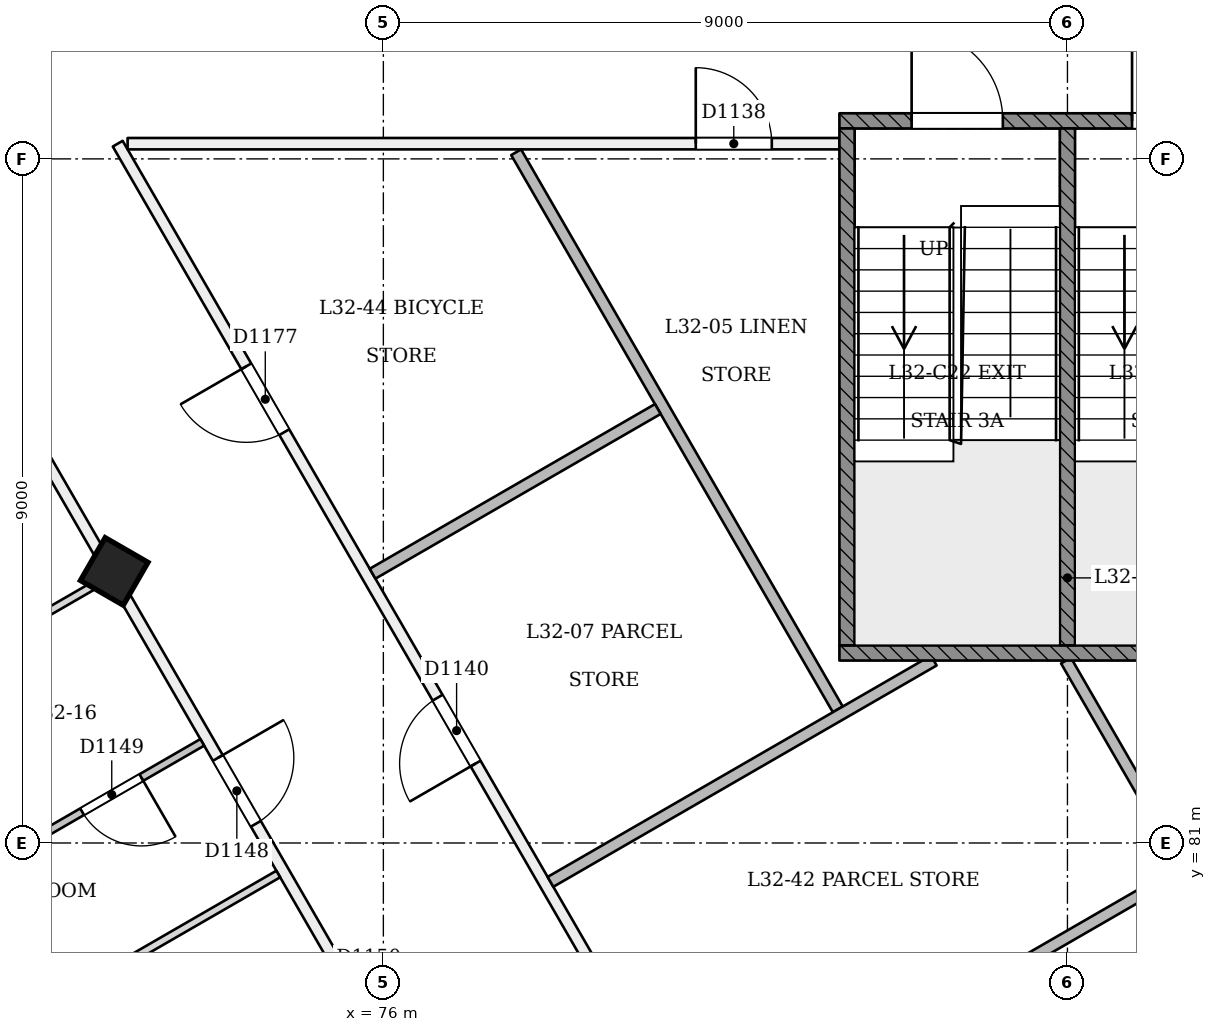
"""IFC4 building model, lengths in metres.
Left out: names, types, materials, properties, quantities, classifications, styles, units other than length and angle.
Written with IfcOpenShell. Run it as: python <this file> out.ifc"""

import sys

from ifc_helpers import new_model, si_unit, direction, frame, frame_2d, origin, origin_2d, place, context, subcontext, project, spatial, rectangle, extrude, element, fill, save


model = new_model("IFC4")
c1 = context("Model", 3, precision=1e-05, world=origin(), true_north=direction((0.0, 1.0)))
c2 = subcontext(c1, "Body", "Model", "MODEL_VIEW")
j1 = project(units=[si_unit("LENGTHUNIT", "METRE"), si_unit("PLANEANGLEUNIT", "RADIAN")], contexts=[c1])
p1 = place(None, origin())
s1 = spatial("IfcSite", under=j1, at=p1, CompositionType="ELEMENT")
p2 = place(p1, origin())
s2 = spatial("IfcBuilding", under=s1, at=p2, CompositionType="ELEMENT")
p3 = place(p2, frame((0.0, 0.0, 127.8)))
s3 = spatial("IfcBuildingStorey", under=s2, at=p3, CompositionType="ELEMENT", Elevation=127.8)
p4 = place(p3, frame((72.432, 84.526, -0.02), z_axis=(0.02222134892, 0.038480872521, 0.999012229206), x_axis=(-0.865639418776, -0.499186807044, 0.038482831667)))
e1 = element("IfcColumn", 1, at=p4, inside=s3, PredefinedType="COLUMN", context=c2, shape_type="SweptSolid", body=[
    extrude(rectangle(XDim=0.65, YDim=0.65, at=origin_2d()), origin(), (0.0, 0.0, 1.0), 3.604),
])
p5 = place(p3, frame((85.0, 68.559, 0.0), z_axis=(0.0, 0.0, 1.0), x_axis=(-0.499999561005, 0.866025657238, 0.0)))
e2 = element("IfcWall", 2, at=p5, inside=s3, PredefinedType="PARTITIONING", context=c2, shape_type="SweptSolid", body=[
    extrude(rectangle(XDim=24.989, YDim=0.15, at=frame_2d((12.495, 0.0))), origin(), (0.0, 0.0, 1.0), 3.15),
])
p6 = place(p5, frame((2.515, 0.0, 0.0)))
e3 = element("IfcOpeningElement", 3, at=p6, cuts=e2, PredefinedType="OPENING", context=c2, shape_type="SweptSolid", body=[
    extrude(rectangle(XDim=0.9, YDim=2.1, at=frame_2d((0.45, 1.05))), frame((0.0, 0.085, 0.0), z_axis=(0.0, -1.0, 0.0), x_axis=(1.0, 0.0, 0.0)), (0.0, 0.0, 1.0), 0.171),
])
p7 = place(p5, frame((15.573, 0.0, 0.0)))
e4 = element("IfcOpeningElement", 4, at=p7, cuts=e2, PredefinedType="OPENING", context=c2, shape_type="SweptSolid", body=[
    extrude(rectangle(XDim=1.0, YDim=2.1, at=frame_2d((0.5, 1.05))), frame((0.0, 0.085, 0.0), z_axis=(0.0, -1.0, 0.0), x_axis=(1.0, 0.0, 0.0)), (0.0, 0.0, 1.0), 0.171),
])
p8 = place(p5, frame((7.186, 0.0, 0.0)))
e5 = element("IfcOpeningElement", 5, at=p8, cuts=e2, PredefinedType="OPENING", context=c2, shape_type="SweptSolid", body=[
    extrude(rectangle(XDim=1.0, YDim=2.1, at=frame_2d((0.5, 1.05))), frame((0.0, 0.085, 0.0), z_axis=(0.0, -1.0, 0.0), x_axis=(1.0, 0.0, 0.0)), (0.0, 0.0, 1.0), 0.171),
])
p9 = place(p5, frame((11.179, 0.0, 0.0)))
e6 = element("IfcOpeningElement", 6, at=p9, cuts=e2, PredefinedType="OPENING", context=c2, shape_type="SweptSolid", body=[
    extrude(rectangle(XDim=1.0, YDim=2.1, at=frame_2d((0.5, 1.05))), frame((0.0, 0.085, 0.0), z_axis=(0.0, -1.0, 0.0), x_axis=(1.0, 0.0, 0.0)), (0.0, 0.0, 1.0), 0.171),
])
p10 = place(p5, frame((20.607, 0.0, 0.0)))
e7 = element("IfcOpeningElement", 7, at=p10, cuts=e2, PredefinedType="OPENING", context=c2, shape_type="SweptSolid", body=[
    extrude(rectangle(XDim=1.0, YDim=2.1, at=frame_2d((0.5, 1.05))), frame((0.0, 0.085, 0.0), z_axis=(0.0, -1.0, 0.0), x_axis=(1.0, 0.0, 0.0)), (0.0, 0.0, 1.0), 0.171),
])
p11 = place(p3, frame((97.495, 90.2, 0.0), z_axis=(0.0, 0.0, 1.0), x_axis=(-0.500000725976, -0.866024984641, 0.0)))
e8 = element("IfcWall", 8, at=p11, inside=s3, PredefinedType="PARTITIONING", context=c2, shape_type="SweptSolid", body=[
    extrude(rectangle(XDim=24.859, YDim=0.15, at=frame_2d((12.43, 0.0))), origin(), (0.0, 0.0, 1.0), 3.15),
])
p12 = place(p11, frame((17.98, 0.0, 0.0)))
e9 = element("IfcOpeningElement", 9, at=p12, cuts=e8, PredefinedType="OPENING", context=c2, shape_type="SweptSolid", body=[
    extrude(rectangle(XDim=1.0, YDim=2.1, at=frame_2d((0.5, 1.05))), frame((0.0, 0.085, 0.0), z_axis=(0.0, -1.0, 0.0), x_axis=(1.0, 0.0, 0.0)), (0.0, 0.0, 1.0), 0.171),
])
p13 = place(p11, frame((3.585, 0.0, 0.0)))
e10 = element("IfcOpeningElement", 10, at=p13, cuts=e8, PredefinedType="OPENING", context=c2, shape_type="SweptSolid", body=[
    extrude(rectangle(XDim=1.0, YDim=2.1, at=frame_2d((0.5, 1.05))), frame((0.0, 0.085, 0.0), z_axis=(0.0, -1.0, 0.0), x_axis=(1.0, 0.0, 0.0)), (0.0, 0.0, 1.0), 0.171),
])
p14 = place(p11, frame((12.131, 0.0, 0.0)))
e11 = element("IfcOpeningElement", 11, at=p14, cuts=e8, PredefinedType="OPENING", context=c2, shape_type="SweptSolid", body=[
    extrude(rectangle(XDim=1.0, YDim=2.1, at=frame_2d((0.5, 1.05))), frame((0.0, 0.085, 0.0), z_axis=(0.0, -1.0, 0.0), x_axis=(1.0, 0.0, 0.0)), (0.0, 0.0, 1.0), 0.171),
])
p15 = place(p11, frame((7.993, 0.0, 0.0)))
e12 = element("IfcOpeningElement", 12, at=p15, cuts=e8, PredefinedType="OPENING", context=c2, shape_type="SweptSolid", body=[
    extrude(rectangle(XDim=1.0, YDim=2.1, at=frame_2d((0.5, 1.05))), frame((0.0, 0.085, 0.0), z_axis=(0.0, -1.0, 0.0), x_axis=(1.0, 0.0, 0.0)), (0.0, 0.0, 1.0), 0.171),
])
p16 = place(p3, frame((64.534, 98.206, 0.0), z_axis=(0.0, 0.0, 1.0), x_axis=(0.499999603446, -0.866025632735, 0.0)))
e13 = element("IfcWall", 13, at=p16, inside=s3, PredefinedType="PARTITIONING", context=c2, shape_type="SweptSolid", body=[
    extrude(rectangle(XDim=40.592, YDim=0.15, at=frame_2d((20.296, 0.0))), origin(), (0.0, 0.0, 1.0), 2.75),
])
p17 = place(p16, frame((0.2, 0.0, 0.0)))
e14 = element("IfcOpeningElement", 14, at=p17, cuts=e13, PredefinedType="OPENING", context=c2, shape_type="SweptSolid", body=[
    extrude(rectangle(XDim=1.2, YDim=2.1, at=frame_2d((0.6, 1.05))), frame((0.0, 0.085, 0.0), z_axis=(0.0, -1.0, 0.0), x_axis=(1.0, 0.0, 0.0)), (0.0, 0.0, 1.0), 0.171),
])
p18 = place(p16, frame((3.016, 0.0, 0.0)))
e15 = element("IfcOpeningElement", 15, at=p18, cuts=e13, PredefinedType="OPENING", context=c2, shape_type="SweptSolid", body=[
    extrude(rectangle(XDim=1.0, YDim=2.1, at=frame_2d((0.5, 1.05))), frame((0.0, 0.085, 0.0), z_axis=(0.0, -1.0, 0.0), x_axis=(1.0, 0.0, 0.0)), (0.0, 0.0, 1.0), 0.171),
])
p19 = place(p16, frame((9.691, 0.0, 0.0)))
e16 = element("IfcOpeningElement", 16, at=p19, cuts=e13, PredefinedType="OPENING", context=c2, shape_type="SweptSolid", body=[
    extrude(rectangle(XDim=1.0, YDim=2.1, at=frame_2d((0.5, 1.05))), frame((0.0, 0.085, 0.0), z_axis=(0.0, -1.0, 0.0), x_axis=(1.0, 0.0, 0.0)), (0.0, 0.0, 1.0), 0.171),
])
p20 = place(p16, frame((11.901, 0.0, 0.0)))
e17 = element("IfcOpeningElement", 17, at=p20, cuts=e13, PredefinedType="OPENING", context=c2, shape_type="SweptSolid", body=[
    extrude(rectangle(XDim=1.0, YDim=2.1, at=frame_2d((0.5, 1.05))), frame((0.0, 0.085, 0.0), z_axis=(0.0, -1.0, 0.0), x_axis=(1.0, 0.0, 0.0)), (0.0, 0.0, 1.0), 0.171),
])
p21 = place(p16, frame((18.576, 0.0, 0.0)))
e18 = element("IfcOpeningElement", 18, at=p21, cuts=e13, PredefinedType="OPENING", context=c2, shape_type="SweptSolid", body=[
    extrude(rectangle(XDim=1.0, YDim=2.1, at=frame_2d((0.5, 1.05))), frame((0.0, 0.085, 0.0), z_axis=(0.0, -1.0, 0.0), x_axis=(1.0, 0.0, 0.0)), (0.0, 0.0, 1.0), 0.171),
])
p22 = place(p16, frame((22.046, 0.0, 0.0)))
e19 = element("IfcOpeningElement", 19, at=p22, cuts=e13, PredefinedType="OPENING", context=c2, shape_type="SweptSolid", body=[
    extrude(rectangle(XDim=1.0, YDim=2.1, at=frame_2d((0.5, 1.05))), frame((0.0, 0.085, 0.0), z_axis=(0.0, -1.0, 0.0), x_axis=(1.0, 0.0, 0.0)), (0.0, 0.0, 1.0), 0.171),
])
p23 = place(p16, frame((27.576, 0.0, 0.0)))
e20 = element("IfcOpeningElement", 20, at=p23, cuts=e13, PredefinedType="OPENING", context=c2, shape_type="SweptSolid", body=[
    extrude(rectangle(XDim=1.0, YDim=2.1, at=frame_2d((0.5, 1.05))), frame((0.0, 0.085, 0.0), z_axis=(0.0, -1.0, 0.0), x_axis=(1.0, 0.0, 0.0)), (0.0, 0.0, 1.0), 0.171),
])
p24 = place(p16, frame((31.046, 0.0, 0.0)))
e21 = element("IfcOpeningElement", 21, at=p24, cuts=e13, PredefinedType="OPENING", context=c2, shape_type="SweptSolid", body=[
    extrude(rectangle(XDim=1.0, YDim=2.1, at=frame_2d((0.5, 1.05))), frame((0.0, 0.085, 0.0), z_axis=(0.0, -1.0, 0.0), x_axis=(1.0, 0.0, 0.0)), (0.0, 0.0, 1.0), 0.171),
])
p25 = place(p16, frame((36.576, 0.0, 0.0)))
e22 = element("IfcOpeningElement", 22, at=p25, cuts=e13, PredefinedType="OPENING", context=c2, shape_type="SweptSolid", body=[
    extrude(rectangle(XDim=1.0, YDim=2.1, at=frame_2d((0.5, 1.05))), frame((0.0, 0.085, 0.0), z_axis=(0.0, -1.0, 0.0), x_axis=(1.0, 0.0, 0.0)), (0.0, 0.0, 1.0), 0.171),
])
p26 = place(p16, frame((39.323, 0.0, 0.0)))
e23 = element("IfcOpeningElement", 23, at=p26, cuts=e13, PredefinedType="OPENING", context=c2, shape_type="SweptSolid", body=[
    extrude(rectangle(XDim=1.0, YDim=2.1, at=frame_2d((0.5, 1.05))), frame((0.0, 0.085, 0.0), z_axis=(0.0, -1.0, 0.0), x_axis=(1.0, 0.0, 0.0)), (0.0, 0.0, 1.0), 0.171),
])
p27 = place(p3, frame((85.17, 63.052, 0.0), z_axis=(0.0, 0.0, 1.0), x_axis=(0.499999603446, 0.866025632735, 0.0)))
e24 = element("IfcWall", 24, at=p27, inside=s3, PredefinedType="PARTITIONING", context=c2, shape_type="SweptSolid", body=[
    extrude(rectangle(XDim=40.592, YDim=0.15, at=frame_2d((20.296, 0.0))), origin(), (0.0, 0.0, 1.0), 2.75),
])
p28 = place(p27, frame((0.273, 0.0, 0.0)))
e25 = element("IfcOpeningElement", 25, at=p28, cuts=e24, PredefinedType="OPENING", context=c2, shape_type="SweptSolid", body=[
    extrude(rectangle(XDim=1.2, YDim=2.1, at=frame_2d((0.6, 1.05))), frame((0.0, 0.085, 0.0), z_axis=(0.0, -1.0, 0.0), x_axis=(1.0, 0.0, 0.0)), (0.0, 0.0, 1.0), 0.171),
])
p29 = place(p27, frame((4.046, 0.0, 0.0)))
e26 = element("IfcOpeningElement", 26, at=p29, cuts=e24, PredefinedType="OPENING", context=c2, shape_type="SweptSolid", body=[
    extrude(rectangle(XDim=1.0, YDim=2.1, at=frame_2d((0.5, 1.05))), frame((0.0, 0.085, 0.0), z_axis=(0.0, -1.0, 0.0), x_axis=(1.0, 0.0, 0.0)), (0.0, 0.0, 1.0), 0.171),
])
p30 = place(p27, frame((9.576, 0.0, 0.0)))
e27 = element("IfcOpeningElement", 27, at=p30, cuts=e24, PredefinedType="OPENING", context=c2, shape_type="SweptSolid", body=[
    extrude(rectangle(XDim=1.0, YDim=2.1, at=frame_2d((0.5, 1.05))), frame((0.0, 0.085, 0.0), z_axis=(0.0, -1.0, 0.0), x_axis=(1.0, 0.0, 0.0)), (0.0, 0.0, 1.0), 0.171),
])
p31 = place(p27, frame((11.901, 0.0, 0.0)))
e28 = element("IfcOpeningElement", 28, at=p31, cuts=e24, PredefinedType="OPENING", context=c2, shape_type="SweptSolid", body=[
    extrude(rectangle(XDim=1.0, YDim=2.1, at=frame_2d((0.5, 1.05))), frame((0.0, 0.085, 0.0), z_axis=(0.0, -1.0, 0.0), x_axis=(1.0, 0.0, 0.0)), (0.0, 0.0, 1.0), 0.171),
])
p32 = place(p27, frame((18.691, 0.0, 0.0)))
e29 = element("IfcOpeningElement", 29, at=p32, cuts=e24, PredefinedType="OPENING", context=c2, shape_type="SweptSolid", body=[
    extrude(rectangle(XDim=1.0, YDim=2.1, at=frame_2d((0.5, 1.05))), frame((0.0, 0.085, 0.0), z_axis=(0.0, -1.0, 0.0), x_axis=(1.0, 0.0, 0.0)), (0.0, 0.0, 1.0), 0.171),
])
p33 = place(p27, frame((21.016, 0.0, 0.0)))
e30 = element("IfcOpeningElement", 30, at=p33, cuts=e24, PredefinedType="OPENING", context=c2, shape_type="SweptSolid", body=[
    extrude(rectangle(XDim=1.0, YDim=2.1, at=frame_2d((0.5, 1.05))), frame((0.0, 0.085, 0.0), z_axis=(0.0, -1.0, 0.0), x_axis=(1.0, 0.0, 0.0)), (0.0, 0.0, 1.0), 0.171),
])
p34 = place(p27, frame((27.576, 0.0, 0.0)))
e31 = element("IfcOpeningElement", 31, at=p34, cuts=e24, PredefinedType="OPENING", context=c2, shape_type="SweptSolid", body=[
    extrude(rectangle(XDim=1.0, YDim=2.1, at=frame_2d((0.5, 1.05))), frame((0.0, 0.085, 0.0), z_axis=(0.0, -1.0, 0.0), x_axis=(1.0, 0.0, 0.0)), (0.0, 0.0, 1.0), 0.171),
])
p35 = place(p27, frame((30.016, 0.0, 0.0)))
e32 = element("IfcOpeningElement", 32, at=p35, cuts=e24, PredefinedType="OPENING", context=c2, shape_type="SweptSolid", body=[
    extrude(rectangle(XDim=1.0, YDim=2.1, at=frame_2d((0.5, 1.05))), frame((0.0, 0.085, 0.0), z_axis=(0.0, -1.0, 0.0), x_axis=(1.0, 0.0, 0.0)), (0.0, 0.0, 1.0), 0.171),
])
p36 = place(p27, frame((39.192, 0.0, 0.0)))
e33 = element("IfcOpeningElement", 33, at=p36, cuts=e24, PredefinedType="OPENING", context=c2, shape_type="SweptSolid", body=[
    extrude(rectangle(XDim=1.2, YDim=2.1, at=frame_2d((0.6, 1.05))), frame((0.0, 0.085, 0.0), z_axis=(0.0, -1.0, 0.0), x_axis=(1.0, 0.0, 0.0)), (0.0, 0.0, 1.0), 0.171),
])
p37 = place(p3, frame((72.635, 90.2, 0.0), z_axis=(0.0, 0.0, 1.0), x_axis=(1.0, 0.0, 0.0)))
e34 = element("IfcWall", 34, at=p37, inside=s3, PredefinedType="PARTITIONING", context=c2, shape_type="SweptSolid", body=[
    extrude(rectangle(XDim=9.365, YDim=0.15, at=frame_2d((4.682, 0.0))), origin(), (0.0, 0.0, 1.0), 3.15),
])
p38 = place(p37, frame((7.475, 0.0, 0.0)))
e35 = element("IfcOpeningElement", 35, at=p38, cuts=e34, PredefinedType="OPENING", context=c2, shape_type="SweptSolid", body=[
    extrude(rectangle(XDim=1.0, YDim=2.1, at=frame_2d((0.5, 1.05))), frame((0.0, 0.085, 0.0), z_axis=(0.0, -1.0, 0.0), x_axis=(1.0, 0.0, 0.0)), (0.0, 0.0, 1.0), 0.171),
])
p39 = place(p3, frame((77.747, 90.087, 0.0), z_axis=(0.0, 0.0, 1.0), x_axis=(0.5000170959, -0.866015533237, 0.0)))
e36 = element("IfcWall", 36, at=p39, inside=s3, PredefinedType="PARTITIONING", context=c2, shape_type="SweptSolid", body=[
    extrude(rectangle(XDim=8.464, YDim=0.15, at=frame_2d((4.232, 0.0))), origin(), (0.0, 0.0, 1.0), 3.15),
])
p40 = place(p3, frame((78.199, 80.489, 0.0), z_axis=(0.0, 0.0, 1.0), x_axis=(0.86603616059, 0.499981368203, 0.0)))
e37 = element("IfcWall", 37, at=p40, inside=s3, PredefinedType="PARTITIONING", context=c2, shape_type="SweptSolid", body=[
    extrude(rectangle(XDim=5.823, YDim=0.15, at=frame_2d((2.911, 0.0))), origin(), (0.0, 0.0, 1.0), 3.15),
])
p41 = place(p3, frame((79.611, 86.709, 0.0), z_axis=(0.0, 0.0, 1.0), x_axis=(-0.866036406277, -0.499980942639, 0.0)))
e38 = element("IfcWall", 38, at=p41, inside=s3, PredefinedType="PARTITIONING", context=c2, shape_type="SweptSolid", body=[
    extrude(rectangle(XDim=4.333, YDim=0.15, at=frame_2d((2.167, 0.0))), origin(), (0.0, 0.0, 1.0), 3.15),
])
p42 = place(p3, frame((69.921, 83.076, 0.0), z_axis=(0.0, 0.0, 1.0), x_axis=(0.866011447264, 0.500024172624, 0.0)))
e39 = element("IfcWall", 39, at=p42, inside=s3, PredefinedType="PARTITIONING", context=c2, shape_type="SweptSolid", body=[
    extrude(rectangle(XDim=2.825, YDim=0.1, at=frame_2d((1.413, 0.0))), origin(), (0.0, 0.0, 1.0), 2.75),
])
p43 = place(p3, frame((73.617, 82.324, 0.0), z_axis=(0.0, 0.0, 1.0), x_axis=(-0.866048868473, -0.499959355765, 0.0)))
e40 = element("IfcWall", 40, at=p43, inside=s3, PredefinedType="PARTITIONING", context=c2, shape_type="SweptSolid", body=[
    extrude(rectangle(XDim=2.825, YDim=0.1, at=frame_2d((1.413, 0.0))), origin(), (0.0, 0.0, 1.0), 3.15),
])
p44 = place(p43, frame((0.925, 0.0, 0.0)))
e41 = element("IfcOpeningElement", 41, at=p44, cuts=e40, PredefinedType="OPENING", context=c2, shape_type="SweptSolid", body=[
    extrude(rectangle(XDim=0.9, YDim=2.1, at=frame_2d((0.45, 1.05))), frame((0.0, 0.061, 0.0), z_axis=(0.0, -1.0, 0.0), x_axis=(1.0, 0.0, 0.0)), (0.0, 0.0, 1.0), 0.121),
])
p45 = place(p3, frame((69.122, 77.419, 0.0), z_axis=(0.0, 0.0, 1.0), x_axis=(0.866025401434, 0.500000004071, 0.0)))
e42 = element("IfcWall", 42, at=p45, inside=s3, PredefinedType="PARTITIONING", context=c2, shape_type="SweptSolid", body=[
    extrude(rectangle(XDim=6.345, YDim=0.1, at=frame_2d((3.173, 0.0))), origin(), (0.0, 0.0, 1.0), 2.65),
])
p46 = place(p3, frame((86.495, 80.627, 0.0), z_axis=(0.0, 0.0, 1.0), x_axis=(-0.866016326422, -0.500015722123, 0.0)))
e43 = element("IfcWall", 43, at=p46, inside=s3, PredefinedType="PARTITIONING", context=c2, shape_type="SweptSolid", body=[
    extrude(rectangle(XDim=7.254, YDim=0.15, at=frame_2d((3.627, 0.0))), origin(), (0.0, 0.0, 1.0), 3.15),
])
p47 = place(p3, frame((88.54, 77.235, 0.0), z_axis=(0.0, 0.0, 1.0), x_axis=(-0.500019316528, 0.866014251095, 0.0)))
e44 = element("IfcWall", 44, at=p47, inside=s3, PredefinedType="PARTITIONING", context=c2, shape_type="SweptSolid", body=[
    extrude(rectangle(XDim=7.119, YDim=0.15, at=frame_2d((3.56, 0.0))), origin(), (0.0, 0.0, 1.0), 3.15),
])
p48 = place(p3, frame((82.0, 90.5, 0.0), z_axis=(0.0, 0.0, 1.0), x_axis=(1.0, 0.0, 0.0)))
e45 = element("IfcWall", 45, at=p48, inside=s3, PredefinedType="SOLIDWALL", context=c2, shape_type="SweptSolid", body=[
    extrude(rectangle(XDim=6.0, YDim=0.2, at=frame_2d((3.0, 0.0))), origin(), (0.0, 0.0, 1.0), 3.15),
])
p49 = place(p48, frame((0.95, 0.0, 0.0)))
e46 = element("IfcOpeningElement", 46, at=p49, cuts=e45, PredefinedType="OPENING", context=c2, shape_type="SweptSolid", body=[
    extrude(rectangle(XDim=1.2, YDim=2.1, at=frame_2d((0.6, 1.05))), frame((0.0, 0.11, 0.0), z_axis=(0.0, -1.0, 0.0), x_axis=(1.0, 0.0, 0.0)), (0.0, 0.0, 1.0), 0.221),
])
p50 = place(p48, frame((3.85, 0.0, 0.0)))
e47 = element("IfcOpeningElement", 47, at=p50, cuts=e45, PredefinedType="OPENING", context=c2, shape_type="SweptSolid", body=[
    extrude(rectangle(XDim=1.2, YDim=2.1, at=frame_2d((0.6, 1.05))), frame((0.0, 0.11, 0.0), z_axis=(0.0, -1.0, 0.0), x_axis=(1.0, 0.0, 0.0)), (0.0, 0.0, 1.0), 0.221),
])
p51 = place(p3, frame((82.0, 83.5, 0.0), z_axis=(0.0, 0.0, 1.0), x_axis=(1.0, 0.0, 0.0)))
e48 = element("IfcWall", 48, at=p51, inside=s3, PredefinedType="SOLIDWALL", context=c2, shape_type="SweptSolid", body=[
    extrude(rectangle(XDim=6.0, YDim=0.2, at=frame_2d((3.0, 0.0))), origin(), (0.0, 0.0, 1.0), 3.15),
])
for number, where, z_axis, x_axis in (
    (49, (82.1, 83.6, 0.0), (0.0, 0.0, 1.0), (0.0, 1.0, 0.0)),
    (50, (85.0, 83.6, 0.0), (0.0, 0.0, 1.0), (0.0, 1.0, 0.0)),
):
    element("IfcWall", number, at=place(p3, frame(where, z_axis=z_axis, x_axis=x_axis)), inside=s3, PredefinedType="SOLIDWALL", context=c2, shape_type="SweptSolid", body=[
        extrude(rectangle(XDim=6.8, YDim=0.2, at=frame_2d((3.4, 0.0))), origin(), (0.0, 0.0, 1.0), 3.15),
    ])
p52 = place(p38, origin())
e51 = element("IfcDoor", 51, at=p52, inside=s3, OperationType="SINGLE_SWING_LEFT", PredefinedType="NOTDEFINED", context=c2, shape_type="SweptSolid", body=[
    extrude(rectangle(XDim=1.0, YDim=2.1, at=frame_2d((0.5, 1.05))), frame((0.0, 0.025, 0.0), z_axis=(0.0, -1.0, 0.0), x_axis=(1.0, 0.0, 0.0)), (0.0, 0.0, 1.0), 0.05),
])
fill(e35, e51)
p53 = place(p7, origin())
e52 = element("IfcDoor", 52, at=p53, inside=s3, OperationType="SINGLE_SWING_LEFT", PredefinedType="NOTDEFINED", context=c2, shape_type="SweptSolid", body=[
    extrude(rectangle(XDim=1.0, YDim=2.1, at=frame_2d((0.5, 1.05))), frame((0.0, 0.025, 0.0), z_axis=(0.0, -1.0, 0.0), x_axis=(1.0, 0.0, 0.0)), (0.0, 0.0, 1.0), 0.05),
])
fill(e4, e52)
p54 = place(p21, origin())
e53 = element("IfcDoor", 53, at=p54, inside=s3, OperationType="SINGLE_SWING_LEFT", PredefinedType="NOTDEFINED", context=c2, shape_type="SweptSolid", body=[
    extrude(rectangle(XDim=1.0, YDim=2.1, at=frame_2d((0.5, 1.05))), frame((0.0, 0.025, 0.0), z_axis=(0.0, -1.0, 0.0), x_axis=(1.0, 0.0, 0.0)), (0.0, 0.0, 1.0), 0.05),
])
fill(e18, e53)
p55 = place(p44, origin())
e54 = element("IfcDoor", 54, at=p55, inside=s3, OperationType="SINGLE_SWING_LEFT", PredefinedType="NOTDEFINED", context=c2, shape_type="SweptSolid", body=[
    extrude(rectangle(XDim=0.9, YDim=2.1, at=frame_2d((0.45, 1.05))), frame((0.0, 0.025, 0.0), z_axis=(0.0, -1.0, 0.0), x_axis=(1.0, 0.0, 0.0)), (0.0, 0.0, 1.0), 0.05),
])
fill(e41, e54)
p56 = place(p10, origin())
e55 = element("IfcDoor", 55, at=p56, inside=s3, OperationType="SINGLE_SWING_RIGHT", PredefinedType="NOTDEFINED", context=c2, shape_type="SweptSolid", body=[
    extrude(rectangle(XDim=1.0, YDim=2.1, at=frame_2d((0.5, 1.05))), frame((0.0, 0.025, 0.0), z_axis=(0.0, -1.0, 0.0), x_axis=(1.0, 0.0, 0.0)), (0.0, 0.0, 1.0), 0.05),
])
fill(e7, e55)
p57 = place(p49, origin())
e56 = element("IfcDoor", 56, at=p57, inside=s3, OperationType="SINGLE_SWING_LEFT", PredefinedType="NOTDEFINED", context=c2, shape_type="SweptSolid", body=[
    extrude(rectangle(XDim=1.2, YDim=2.1, at=frame_2d((0.6, 1.05))), frame((0.0, 0.025, 0.0), z_axis=(0.0, -1.0, 0.0), x_axis=(1.0, 0.0, 0.0)), (0.0, 0.0, 1.0), 0.05),
])
fill(e46, e56)
p58 = place(p50, origin())
e57 = element("IfcDoor", 57, at=p58, inside=s3, OperationType="SINGLE_SWING_LEFT", PredefinedType="NOTDEFINED", context=c2, shape_type="SweptSolid", body=[
    extrude(rectangle(XDim=1.2, YDim=2.1, at=frame_2d((0.6, 1.05))), frame((0.0, 0.025, 0.0), z_axis=(0.0, -1.0, 0.0), x_axis=(1.0, 0.0, 0.0)), (0.0, 0.0, 1.0), 0.05),
])
fill(e47, e57)
save(model, sys.argv[1])
